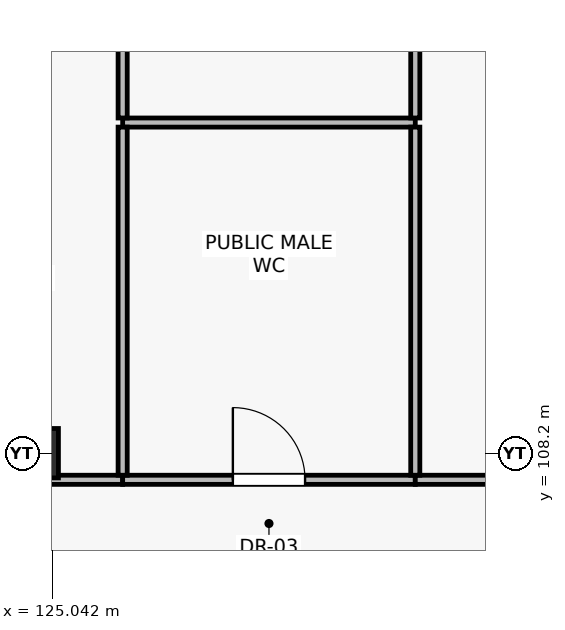
"""IFC4 building model, lengths in metres.
Left out: names, types, materials, properties, quantities, classifications, styles, units other than length and angle.
Written with IfcOpenShell. Run it as: python <this file> out.ifc"""

import sys

from ifc_helpers import new_model, si_unit, direction, frame, frame_2d, origin, origin_2d, place, context, subcontext, project, spatial, rectangle, extrude, element, fill, save


model = new_model("IFC4")
c1 = context("Model", 3, precision=1e-05, world=origin(), true_north=direction((0.0, 1.0)))
c2 = subcontext(c1, "Body", "Model", "MODEL_VIEW")
j1 = project(units=[si_unit("LENGTHUNIT", "METRE"), si_unit("PLANEANGLEUNIT", "RADIAN")], contexts=[c1])
p1 = place(None, origin())
s1 = spatial("IfcSite", under=j1, at=p1, CompositionType="ELEMENT")
p2 = place(p1, origin())
s2 = spatial("IfcBuilding", under=s1, at=p2, CompositionType="ELEMENT")
p3 = place(p2, origin())
s3 = spatial("IfcBuildingStorey", under=s2, at=p3, CompositionType="ELEMENT", Elevation=0.0)
p4 = place(p3, frame((124.8, 108.2, 0.0), z_axis=(0.0, 0.0, 1.0), x_axis=(1.0, 0.0, 0.0)))
e1 = element("IfcColumn", 1, at=p4, inside=s3, PredefinedType="COLUMN", context=c2, shape_type="SweptSolid", body=[
    extrude(rectangle(XDim=0.65, YDim=0.65, at=origin_2d()), origin(), (0.0, 0.0, 1.0), 4.8),
])
p5 = place(p3, frame((122.57, 107.85, 0.0), z_axis=(0.0, 0.0, 1.0), x_axis=(1.0, 0.0, 0.0)))
e2 = element("IfcWall", 2, at=p5, inside=s3, PredefinedType="PARTITIONING", context=c2, shape_type="SweptSolid", body=[
    extrude(rectangle(XDim=3.4, YDim=0.12, at=frame_2d((1.7, 0.0))), origin(), (0.0, 0.0, 1.0), 4.04),
])
p6 = place(p5, frame((0.375, 0.0, 0.0)))
e3 = element("IfcOpeningElement", 3, at=p6, cuts=e2, PredefinedType="OPENING", context=c2, shape_type="SweptSolid", body=[
    extrude(rectangle(XDim=0.95, YDim=2.1, at=frame_2d((0.475, 1.05))), frame((0.0, 0.07, 0.0), z_axis=(0.0, -1.0, 0.0), x_axis=(1.0, 0.0, 0.0)), (0.0, 0.0, 1.0), 0.14),
])
p7 = place(p3, frame((125.97, 107.85, 0.0), z_axis=(0.0, 0.0, 1.0), x_axis=(1.0, 0.0, 0.0)))
e4 = element("IfcWall", 4, at=p7, inside=s3, PredefinedType="PARTITIONING", context=c2, shape_type="SweptSolid", body=[
    extrude(rectangle(XDim=3.85, YDim=0.12, at=frame_2d((1.925, 0.0))), origin(), (0.0, 0.0, 1.0), 4.04),
])
p8 = place(p7, frame((1.45, 0.0, 0.0)))
e5 = element("IfcOpeningElement", 5, at=p8, cuts=e4, PredefinedType="OPENING", context=c2, shape_type="SweptSolid", body=[
    extrude(rectangle(XDim=0.95, YDim=2.1, at=frame_2d((0.475, 1.05))), frame((0.0, 0.07, 0.0), z_axis=(0.0, -1.0, 0.0), x_axis=(1.0, 0.0, 0.0)), (0.0, 0.0, 1.0), 0.14),
])
p9 = place(p3, frame((125.97, 112.55, 0.0), z_axis=(0.0, 0.0, 1.0), x_axis=(1.0, 0.0, 0.0)))
e6 = element("IfcWall", 6, at=p9, inside=s3, PredefinedType="PARTITIONING", context=c2, shape_type="SweptSolid", body=[
    extrude(rectangle(XDim=3.85, YDim=0.12, at=frame_2d((1.925, 0.0))), origin(), (0.0, 0.0, 1.0), 4.54),
])
p10 = place(p3, frame((129.82, 107.85, 0.0), z_axis=(0.0, 0.0, 1.0), x_axis=(1.0, 0.0, 0.0)))
e7 = element("IfcWall", 7, at=p10, inside=s3, PredefinedType="PARTITIONING", context=c2, shape_type="SweptSolid", body=[
    extrude(rectangle(XDim=6.4, YDim=0.12, at=frame_2d((3.2, 0.0))), origin(), (0.0, 0.0, 1.0), 4.04),
])
p11 = place(p10, frame((3.585, 0.0, 0.0)))
e8 = element("IfcOpeningElement", 8, at=p11, cuts=e7, PredefinedType="OPENING", context=c2, shape_type="SweptSolid", body=[
    extrude(rectangle(XDim=1.15, YDim=2.2, at=frame_2d((0.575, 1.1))), frame((0.0, 0.07, 0.0), z_axis=(0.0, -1.0, 0.0), x_axis=(1.0, 0.0, 0.0)), (0.0, 0.0, 1.0), 0.14),
])
p12 = place(p3, frame((125.97, 107.91, 0.0), z_axis=(0.0, 0.0, 1.0), x_axis=(0.0, 1.0, 0.0)))
e9 = element("IfcWall", 9, at=p12, inside=s3, PredefinedType="PARTITIONING", context=c2, shape_type="SweptSolid", body=[
    extrude(rectangle(XDim=4.58, YDim=0.12, at=frame_2d((2.29, 0.0))), origin(), (0.0, 0.0, 1.0), 4.54),
])
p13 = place(p3, frame((125.97, 112.61, 0.0), z_axis=(0.0, 0.0, 1.0), x_axis=(0.0, 1.0, 0.0)))
e10 = element("IfcWall", 10, at=p13, inside=s3, PredefinedType="PARTITIONING", context=c2, shape_type="SweptSolid", body=[
    extrude(rectangle(XDim=3.22, YDim=0.12, at=frame_2d((1.61, 0.0))), origin(), (0.0, 0.0, 1.0), 4.54),
])
p14 = place(p3, frame((129.82, 107.91, 0.0), z_axis=(0.0, 0.0, 1.0), x_axis=(0.0, 1.0, 0.0)))
e11 = element("IfcWall", 11, at=p14, inside=s3, PredefinedType="PARTITIONING", context=c2, shape_type="SweptSolid", body=[
    extrude(rectangle(XDim=4.58, YDim=0.12, at=frame_2d((2.29, 0.0))), origin(), (0.0, 0.0, 1.0), 4.21),
])
p15 = place(p3, frame((129.82, 112.61, 0.0), z_axis=(0.0, 0.0, 1.0), x_axis=(0.0, 1.0, 0.0)))
e12 = element("IfcWall", 12, at=p15, inside=s3, PredefinedType="PARTITIONING", context=c2, shape_type="SweptSolid", body=[
    extrude(rectangle(XDim=3.22, YDim=0.12, at=frame_2d((1.61, 0.0))), origin(), (0.0, 0.0, 1.0), 4.21),
])
p16 = place(p8, origin())
e13 = element("IfcDoor", 13, at=p16, inside=s3, OperationType="SINGLE_SWING_LEFT", PredefinedType="DOOR", context=c2, shape_type="SweptSolid", body=[
    extrude(rectangle(XDim=0.95, YDim=2.1, at=frame_2d((0.475, 1.05))), frame((0.0, 0.025, 0.0), z_axis=(0.0, -1.0, 0.0), x_axis=(1.0, 0.0, 0.0)), (0.0, 0.0, 1.0), 0.05),
])
fill(e5, e13)
save(model, sys.argv[1])
